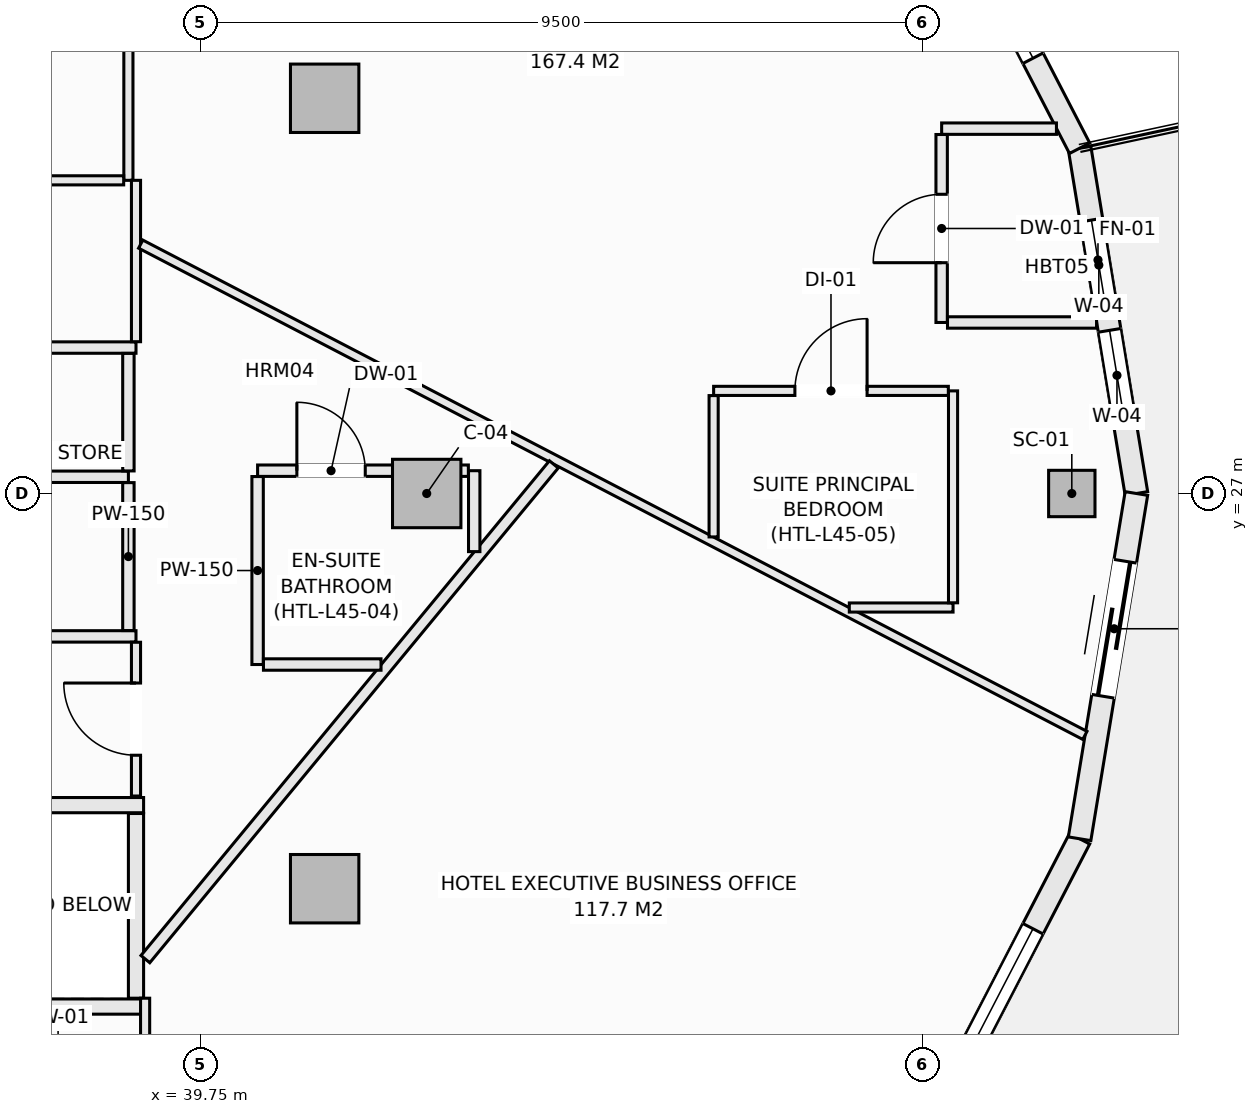
"""IFC4 building model, lengths in metres.
Left out: names, types, materials, properties, quantities, classifications, styles, units other than length and angle.
Written with IfcOpenShell. Run it as: python <this file> out.ifc"""

import sys

from ifc_helpers import new_model, si_unit, direction, frame, frame_2d, origin, origin_2d, place, context, subcontext, project, spatial, rectangle, hollow_rectangle, extrude, element, fill, save


model = new_model("IFC4")
c1 = context("Model", 3, precision=1e-05, world=origin(), true_north=direction((0.0, 1.0)))
c2 = subcontext(c1, "Body", "Model", "MODEL_VIEW")
j1 = project(units=[si_unit("LENGTHUNIT", "METRE"), si_unit("PLANEANGLEUNIT", "RADIAN")], contexts=[c1])
p1 = place(None, origin())
s1 = spatial("IfcSite", under=j1, at=p1, CompositionType="ELEMENT")
p2 = place(p1, origin())
s2 = spatial("IfcBuilding", under=s1, at=p2, CompositionType="ELEMENT")
p3 = place(p2, frame((0.0, 0.0, 173.3)))
s3 = spatial("IfcBuildingStorey", under=s2, at=p3, CompositionType="ELEMENT", Elevation=173.3)
p4 = place(p3, frame((51.212, 27.0, -0.27), z_axis=(0.0, 0.0, 1.0), x_axis=(1.0, 0.0, 0.0)))
e1 = element("IfcColumn", 1, at=p4, inside=s3, PredefinedType="COLUMN", context=c2, shape_type="SweptSolid", body=[
    extrude(hollow_rectangle(XDim=0.61, YDim=0.61, WallThickness=0.025, at=origin_2d()), origin(), (0.0, 0.0, 1.0), 3.4),
])
for number, where, z_axis, x_axis in (
    (2, (42.725, 27.0, -0.27), (0.0, 0.0, 1.0), (1.0, 0.0, 0.0)),
    (3, (41.382, 32.199, -0.27), (0.0, 0.0, 1.0), (1.0, 0.0, 0.0)),
    (4, (41.382, 21.801, -0.27), (0.0, 0.0, 1.0), (1.0, 0.0, 0.0)),
):
    element("IfcColumn", number, at=place(p3, frame(where, z_axis=z_axis, x_axis=x_axis)), inside=s3, PredefinedType="COLUMN", context=c2, shape_type="SweptSolid", body=[
        extrude(rectangle(XDim=0.9, YDim=0.9, at=origin_2d()), origin(), (0.0, 0.0, 1.0), 3.4),
    ])
p5 = place(p3, frame((51.315, 31.542, 0.0), z_axis=(0.0, 0.0, 1.0), x_axis=(0.162394765401, -0.986725868806, 0.0)))
e5 = element("IfcWall", 5, at=p5, inside=s3, PredefinedType="SOLIDWALL", context=c2, shape_type="SweptSolid", body=[
    extrude(rectangle(XDim=4.603, YDim=0.3, at=frame_2d((2.302, 0.0))), origin(), (0.0, 0.0, 1.0), 2.653),
])
p6 = place(p5, frame((0.958, 0.0, 0.74)))
e6 = element("IfcOpeningElement", 6, at=p6, cuts=e5, PredefinedType="OPENING", context=c2, shape_type="SweptSolid", body=[
    extrude(rectangle(XDim=1.2, YDim=1.7, at=frame_2d((0.6, 0.85))), frame((0.0, 0.16, 0.0), z_axis=(0.0, -1.0, 0.0), x_axis=(1.0, 0.0, 0.0)), (0.0, 0.0, 1.0), 0.32),
])
p7 = place(p5, frame((2.428, 0.0, 0.74)))
e7 = element("IfcOpeningElement", 7, at=p7, cuts=e5, PredefinedType="OPENING", context=c2, shape_type="SweptSolid", body=[
    extrude(rectangle(XDim=1.2, YDim=1.7, at=frame_2d((0.6, 0.85))), frame((0.0, 0.16, 0.0), z_axis=(0.0, -1.0, 0.0), x_axis=(1.0, 0.0, 0.0)), (0.0, 0.0, 1.0), 0.32),
])
p8 = place(p3, frame((49.123, 35.775, 0.0), z_axis=(0.0, 0.0, 1.0), x_axis=(0.459810251451, -0.888017191647, 0.0)))
e8 = element("IfcWall", 8, at=p8, inside=s3, PredefinedType="SOLIDWALL", context=c2, shape_type="SweptSolid", body=[
    extrude(rectangle(XDim=4.766, YDim=0.3, at=frame_2d((2.383, 0.0))), origin(), (0.0, 0.0, 1.0), 2.653),
])
p9 = place(p8, frame((1.333, 0.0, 0.74)))
e9 = element("IfcOpeningElement", 9, at=p9, cuts=e8, PredefinedType="OPENING", context=c2, shape_type="SweptSolid", body=[
    extrude(rectangle(XDim=2.1, YDim=1.7, at=frame_2d((1.05, 0.85))), frame((0.0, 0.16, 0.0), z_axis=(0.0, -1.0, 0.0), x_axis=(1.0, 0.0, 0.0)), (0.0, 0.0, 1.0), 0.32),
])
p10 = place(p3, frame((49.123, 18.225, 0.0), z_axis=(0.0, 0.0, 1.0), x_axis=(0.459810251451, 0.888017191647, 0.0)))
e10 = element("IfcWall", 10, at=p10, inside=s3, PredefinedType="SOLIDWALL", context=c2, shape_type="SweptSolid", body=[
    extrude(rectangle(XDim=4.766, YDim=0.3, at=frame_2d((2.383, 0.0))), origin(), (0.0, 0.0, 1.0), 2.653),
])
p11 = place(p10, frame((1.333, 0.0, 0.74)))
e11 = element("IfcOpeningElement", 11, at=p11, cuts=e10, PredefinedType="OPENING", context=c2, shape_type="SweptSolid", body=[
    extrude(rectangle(XDim=2.1, YDim=1.7, at=frame_2d((1.05, 0.85))), frame((0.0, 0.16, 0.0), z_axis=(0.0, -1.0, 0.0), x_axis=(1.0, 0.0, 0.0)), (0.0, 0.0, 1.0), 0.32),
])
p12 = place(p3, frame((51.315, 22.458, 0.0), z_axis=(0.0, 0.0, 1.0), x_axis=(0.162394765401, 0.986725868806, 0.0)))
e12 = element("IfcWall", 12, at=p12, inside=s3, PredefinedType="SOLIDWALL", context=c2, shape_type="SweptSolid", body=[
    extrude(rectangle(XDim=4.603, YDim=0.3, at=frame_2d((2.302, 0.0))), origin(), (0.0, 0.0, 1.0), 2.653),
])
p13 = place(p12, frame((1.9, 0.0, 0.0)))
e13 = element("IfcOpeningElement", 13, at=p13, cuts=e12, PredefinedType="OPENING", context=c2, shape_type="SweptSolid", body=[
    extrude(rectangle(XDim=1.8, YDim=2.25, at=frame_2d((0.9, 1.125))), frame((0.0, 0.16, 0.0), z_axis=(0.0, -1.0, 0.0), x_axis=(1.0, 0.0, 0.0)), (0.0, 0.0, 1.0), 0.32),
])
p14 = place(p3, frame((52.18, 16.779, 0.0), z_axis=(0.0, 0.0, 1.0), x_axis=(0.439637174641, 0.898175458735, 0.0)))
e14 = element("IfcWall", 14, at=p14, inside=s3, PredefinedType="PARAPET", context=c2, shape_type="SweptSolid", body=[
    extrude(rectangle(XDim=5.567, YDim=0.22, at=frame_2d((2.784, 0.0))), origin(), (0.0, 0.0, 1.0), 0.52),
])
for number, where, z_axis, x_axis in (
    (15, (36.75, 22.9, 0.0), (0.0, 0.0, 1.0), (1.0, 0.0, 0.0)),
    (16, (36.75, 20.25, 0.0), (0.0, 0.0, 1.0), (1.0, 0.0, 0.0)),
):
    element("IfcWall", number, at=place(p3, frame(where, z_axis=z_axis, x_axis=x_axis)), inside=s3, PredefinedType="SOLIDWALL", context=c2, shape_type="SweptSolid", body=[
        extrude(rectangle(XDim=2.25, YDim=0.2, at=frame_2d((1.125, 0.0))), origin(), (0.0, 0.0, 1.0), 3.13),
    ])
p15 = place(p3, frame((38.9, 20.36, 0.0), z_axis=(0.0, 0.0, 1.0), x_axis=(0.0, 1.0, 0.0)))
e17 = element("IfcWall", 17, at=p15, inside=s3, PredefinedType="SOLIDWALL", context=c2, shape_type="SweptSolid", body=[
    extrude(rectangle(XDim=2.43, YDim=0.2, at=frame_2d((1.215, 0.0))), origin(), (0.0, 0.0, 1.0), 3.13),
])
p16 = place(p3, frame((30.077, 28.92, 0.0), z_axis=(0.0, 0.0, 1.0), x_axis=(1.0, 0.0, 0.0)))
e18 = element("IfcWall", 18, at=p16, inside=s3, PredefinedType="PARTITIONING", context=c2, shape_type="SweptSolid", body=[
    extrude(rectangle(XDim=8.823, YDim=0.15, at=frame_2d((4.412, 0.0))), origin(), (0.0, 0.0, 1.0), 3.13),
])
p17 = place(p16, frame((1.342, 0.0, 0.0)))
e19 = element("IfcOpeningElement", 19, at=p17, cuts=e18, PredefinedType="OPENING", context=c2, shape_type="SweptSolid", body=[
    extrude(rectangle(XDim=0.95, YDim=2.1, at=frame_2d((0.475, 1.05))), frame((0.0, 0.085, 0.0), z_axis=(0.0, -1.0, 0.0), x_axis=(1.0, 0.0, 0.0)), (0.0, 0.0, 1.0), 0.17),
])
p18 = place(p16, frame((5.343, 0.0, 0.0)))
e20 = element("IfcOpeningElement", 20, at=p18, cuts=e18, PredefinedType="OPENING", context=c2, shape_type="SweptSolid", body=[
    extrude(rectangle(XDim=0.95, YDim=2.1, at=frame_2d((0.475, 1.05))), frame((0.0, 0.085, 0.0), z_axis=(0.0, -1.0, 0.0), x_axis=(1.0, 0.0, 0.0)), (0.0, 0.0, 1.0), 0.17),
])
p19 = place(p3, frame((33.377, 25.12, 0.0), z_axis=(0.0, 0.0, 1.0), x_axis=(1.0, 0.0, 0.0)))
e21 = element("IfcWall", 21, at=p19, inside=s3, PredefinedType="PARTITIONING", context=c2, shape_type="SweptSolid", body=[
    extrude(rectangle(XDim=5.523, YDim=0.15, at=frame_2d((2.761, 0.0))), origin(), (0.0, 0.0, 1.0), 3.13),
])
p20 = place(p19, frame((2.287, 0.0, 0.0)))
e22 = element("IfcOpeningElement", 22, at=p20, cuts=e21, PredefinedType="OPENING", context=c2, shape_type="SweptSolid", body=[
    extrude(rectangle(XDim=0.95, YDim=2.1, at=frame_2d((0.475, 1.05))), frame((0.0, 0.085, 0.0), z_axis=(0.0, -1.0, 0.0), x_axis=(1.0, 0.0, 0.0)), (0.0, 0.0, 1.0), 0.17),
])
p21 = place(p3, frame((33.377, 27.22, 0.0), z_axis=(0.0, 0.0, 1.0), x_axis=(1.0, 0.0, 0.0)))
e23 = element("IfcWall", 23, at=p21, inside=s3, PredefinedType="PARTITIONING", context=c2, shape_type="SweptSolid", body=[
    extrude(rectangle(XDim=5.423, YDim=0.15, at=frame_2d((2.711, 0.0))), origin(), (0.0, 0.0, 1.0), 3.13),
])
p22 = place(p3, frame((38.8, 25.197, 0.0), z_axis=(0.0, 0.0, 1.0), x_axis=(0.0, 1.0, 0.0)))
e24 = element("IfcWall", 24, at=p22, inside=s3, PredefinedType="PARTITIONING", context=c2, shape_type="SweptSolid", body=[
    extrude(rectangle(XDim=1.946, YDim=0.15, at=frame_2d((0.973, 0.0))), origin(), (0.0, 0.0, 1.0), 3.13),
])
p23 = place(p3, frame((38.8, 27.297, 0.0), z_axis=(0.0, 0.0, 1.0), x_axis=(0.0, 1.0, 0.0)))
e25 = element("IfcWall", 25, at=p23, inside=s3, PredefinedType="PARTITIONING", context=c2, shape_type="SweptSolid", body=[
    extrude(rectangle(XDim=1.546, YDim=0.15, at=frame_2d((0.773, 0.0))), origin(), (0.0, 0.0, 1.0), 3.13),
])
p24 = place(p3, frame((38.8, 31.12, 0.0), z_axis=(0.0, 0.0, 1.0), x_axis=(0.0, 1.0, 0.0)))
e26 = element("IfcWall", 26, at=p24, inside=s3, PredefinedType="PARTITIONING", context=c2, shape_type="SweptSolid", body=[
    extrude(rectangle(XDim=2.63, YDim=0.12, at=frame_2d((1.315, 0.0))), origin(), (0.0, 0.0, 1.0), 3.13),
])
p25 = place(p3, frame((30.062, 31.12, 0.0), z_axis=(0.0, 0.0, 1.0), x_axis=(1.0, 0.0, 0.0)))
e27 = element("IfcWall", 27, at=p25, inside=s3, PredefinedType="PARTITIONING", context=c2, shape_type="SweptSolid", body=[
    extrude(rectangle(XDim=8.676, YDim=0.12, at=frame_2d((4.338, 0.0))), origin(), (0.0, 0.0, 1.0), 3.13),
])
p26 = place(p25, frame((3.863, 0.0, 0.0)))
e28 = element("IfcOpeningElement", 28, at=p26, cuts=e27, PredefinedType="OPENING", context=c2, shape_type="SweptSolid", body=[
    extrude(rectangle(XDim=0.95, YDim=2.1, at=frame_2d((0.475, 1.05))), frame((0.0, 0.07, 0.0), z_axis=(0.0, -1.0, 0.0), x_axis=(1.0, 0.0, 0.0)), (0.0, 0.0, 1.0), 0.14),
])
p27 = place(p3, frame((39.02, 19.44, 0.0), z_axis=(0.0, 0.0, 1.0), x_axis=(0.0, 1.0, 0.0)))
e29 = element("IfcWall", 29, at=p27, inside=s3, PredefinedType="PARTITIONING", context=c2, shape_type="SweptSolid", body=[
    extrude(rectangle(XDim=0.92, YDim=0.12, at=frame_2d((0.46, 0.0))), origin(), (0.0, 0.0, 1.0), 3.13),
])
p28 = place(p3, frame((38.9, 23.02, 0.0), z_axis=(0.0, 0.0, 1.0), x_axis=(0.0, 1.0, 0.0)))
e30 = element("IfcWall", 30, at=p28, inside=s3, PredefinedType="PARTITIONING", context=c2, shape_type="SweptSolid", body=[
    extrude(rectangle(XDim=2.023, YDim=0.12, at=frame_2d((1.011, 0.0))), origin(), (0.0, 0.0, 1.0), 3.13),
])
p29 = place(p28, frame((0.537, 0.0, 0.0)))
e31 = element("IfcOpeningElement", 31, at=p29, cuts=e30, PredefinedType="OPENING", context=c2, shape_type="SweptSolid", body=[
    extrude(rectangle(XDim=0.95, YDim=2.1, at=frame_2d((0.475, 1.05))), frame((0.0, 0.07, 0.0), z_axis=(0.0, -1.0, 0.0), x_axis=(1.0, 0.0, 0.0)), (0.0, 0.0, 1.0), 0.14),
])
p30 = place(p3, frame((38.9, 28.997, 0.0), z_axis=(0.0, 0.0, 1.0), x_axis=(0.0, 1.0, 0.0)))
e32 = element("IfcWall", 32, at=p30, inside=s3, PredefinedType="PARTITIONING", context=c2, shape_type="SweptSolid", body=[
    extrude(rectangle(XDim=2.123, YDim=0.12, at=frame_2d((1.062, 0.0))), origin(), (0.0, 0.0, 1.0), 3.13),
])
p31 = place(p3, frame((38.962, 30.281, 0.0), z_axis=(0.0, 0.0, 1.0), x_axis=(0.887114590422, -0.461549242725, 0.0)))
e33 = element("IfcWall", 33, at=p31, inside=s3, PredefinedType="PARTITIONING", context=c2, shape_type="SweptSolid", body=[
    extrude(rectangle(XDim=14.004, YDim=0.12, at=frame_2d((7.002, 0.0))), origin(), (0.0, 0.0, 1.0), 2.505),
])
p32 = place(p3, frame((39.023, 20.874, 0.0), z_axis=(0.0, 0.0, 1.0), x_axis=(0.636698291185, 0.771113017658, 0.0)))
e34 = element("IfcWall", 34, at=p32, inside=s3, PredefinedType="PARTITIONING", context=c2, shape_type="SweptSolid", body=[
    extrude(rectangle(XDim=8.44, YDim=0.15, at=frame_2d((4.22, 0.0))), origin(), (0.0, 0.0, 1.0), 2.505),
])
p33 = place(p3, frame((43.35, 26.235, 0.0), z_axis=(0.0, 0.0, 1.0), x_axis=(0.0, 1.0, 0.0)))
e35 = element("IfcWall", 35, at=p33, inside=s3, PredefinedType="PARTITIONING", context=c2, shape_type="SweptSolid", body=[
    extrude(rectangle(XDim=1.065, YDim=0.15, at=frame_2d((0.532, 0.0))), origin(), (0.0, 0.0, 1.0), 3.13),
])
p34 = place(p3, frame((40.5, 27.3, 0.0), z_axis=(0.0, 0.0, 1.0), x_axis=(1.0, 0.0, 0.0)))
e36 = element("IfcWall", 36, at=p34, inside=s3, PredefinedType="PARTITIONING", context=c2, shape_type="SweptSolid", body=[
    extrude(rectangle(XDim=2.773, YDim=0.15, at=frame_2d((1.386, 0.0))), origin(), (0.0, 0.0, 1.0), 3.13),
])
p35 = place(p34, frame((0.517, 0.0, 0.0)))
e37 = element("IfcOpeningElement", 37, at=p35, cuts=e36, PredefinedType="OPENING", context=c2, shape_type="SweptSolid", body=[
    extrude(rectangle(XDim=0.9, YDim=2.1, at=frame_2d((0.45, 1.05))), frame((0.0, 0.085, 0.0), z_axis=(0.0, -1.0, 0.0), x_axis=(1.0, 0.0, 0.0)), (0.0, 0.0, 1.0), 0.17),
])
p36 = place(p3, frame((40.5, 24.75, 0.0), z_axis=(0.0, 0.0, 1.0), x_axis=(0.0, 1.0, 0.0)))
e38 = element("IfcWall", 38, at=p36, inside=s3, PredefinedType="PARTITIONING", context=c2, shape_type="SweptSolid", body=[
    extrude(rectangle(XDim=2.473, YDim=0.15, at=frame_2d((1.236, 0.0))), origin(), (0.0, 0.0, 1.0), 3.13),
])
p37 = place(p3, frame((40.577, 24.75, 0.0), z_axis=(0.0, 0.0, 1.0), x_axis=(1.0, 0.0, 0.0)))
e39 = element("IfcWall", 39, at=p37, inside=s3, PredefinedType="PARTITIONING", context=c2, shape_type="SweptSolid", body=[
    extrude(rectangle(XDim=1.547, YDim=0.15, at=frame_2d((0.773, 0.0))), origin(), (0.0, 0.0, 1.0), 3.13),
])
p38 = place(p3, frame((49.5, 31.8, 0.0), z_axis=(0.0, 0.0, 1.0), x_axis=(1.0, 0.0, 0.0)))
e40 = element("IfcWall", 40, at=p38, inside=s3, PredefinedType="PARTITIONING", context=c2, shape_type="SweptSolid", body=[
    extrude(rectangle(XDim=1.51, YDim=0.15, at=frame_2d((0.755, 0.0))), origin(), (0.0, 0.0, 1.0), 3.13),
])
p39 = place(p3, frame((49.5, 29.25, 0.0), z_axis=(0.0, 0.0, 1.0), x_axis=(0.0, 1.0, 0.0)))
e41 = element("IfcWall", 41, at=p39, inside=s3, PredefinedType="PARTITIONING", context=c2, shape_type="SweptSolid", body=[
    extrude(rectangle(XDim=2.473, YDim=0.15, at=frame_2d((1.236, 0.0))), origin(), (0.0, 0.0, 1.0), 2.653),
])
p40 = place(p39, frame((0.787, 0.0, 0.0)))
e42 = element("IfcOpeningElement", 42, at=p40, cuts=e41, PredefinedType="OPENING", context=c2, shape_type="SweptSolid", body=[
    extrude(rectangle(XDim=0.9, YDim=2.1, at=frame_2d((0.45, 1.05))), frame((0.0, 0.085, 0.0), z_axis=(0.0, -1.0, 0.0), x_axis=(1.0, 0.0, 0.0)), (0.0, 0.0, 1.0), 0.17),
])
p41 = place(p3, frame((49.577, 29.25, 0.0), z_axis=(0.0, 0.0, 1.0), x_axis=(1.0, 0.0, 0.0)))
e43 = element("IfcWall", 43, at=p41, inside=s3, PredefinedType="PARTITIONING", context=c2, shape_type="SweptSolid", body=[
    extrude(rectangle(XDim=1.961, YDim=0.15, at=frame_2d((0.98, 0.0))), origin(), (0.0, 0.0, 1.0), 3.13),
])
p42 = place(p3, frame((48.285, 25.5, 0.0), z_axis=(0.0, 0.0, 1.0), x_axis=(1.0, 0.0, 0.0)))
e44 = element("IfcWall", 44, at=p42, inside=s3, PredefinedType="PARTITIONING", context=c2, shape_type="SweptSolid", body=[
    extrude(rectangle(XDim=1.365, YDim=0.12, at=frame_2d((0.682, 0.0))), origin(), (0.0, 0.0, 1.0), 3.13),
])
p43 = place(p3, frame((49.65, 25.562, 0.0), z_axis=(0.0, 0.0, 1.0), x_axis=(0.0, 1.0, 0.0)))
e45 = element("IfcWall", 45, at=p43, inside=s3, PredefinedType="PARTITIONING", context=c2, shape_type="SweptSolid", body=[
    extrude(rectangle(XDim=2.788, YDim=0.12, at=frame_2d((1.394, 0.0))), origin(), (0.0, 0.0, 1.0), 3.13),
])
p44 = place(p3, frame((46.5, 28.35, 0.0), z_axis=(0.0, 0.0, 1.0), x_axis=(1.0, 0.0, 0.0)))
e46 = element("IfcWall", 46, at=p44, inside=s3, PredefinedType="PARTITIONING", context=c2, shape_type="SweptSolid", body=[
    extrude(rectangle(XDim=3.088, YDim=0.12, at=frame_2d((1.544, 0.0))), origin(), (0.0, 0.0, 1.0), 3.13),
])
p45 = place(p44, frame((1.069, 0.0, 0.0)))
e47 = element("IfcOpeningElement", 47, at=p45, cuts=e46, PredefinedType="OPENING", context=c2, shape_type="SweptSolid", body=[
    extrude(rectangle(XDim=0.95, YDim=2.1, at=frame_2d((0.475, 1.05))), frame((0.0, 0.07, 0.0), z_axis=(0.0, -1.0, 0.0), x_axis=(1.0, 0.0, 0.0)), (0.0, 0.0, 1.0), 0.14),
])
p46 = place(p3, frame((46.5, 26.429, 0.0), z_axis=(0.0, 0.0, 1.0), x_axis=(0.0, 1.0, 0.0)))
e48 = element("IfcWall", 48, at=p46, inside=s3, PredefinedType="PARTITIONING", context=c2, shape_type="SweptSolid", body=[
    extrude(rectangle(XDim=1.859, YDim=0.12, at=frame_2d((0.93, 0.0))), origin(), (0.0, 0.0, 1.0), 3.13),
])
p47 = place(p6, origin())
e49 = element("IfcWindow", 49, at=p47, inside=s3, PartitioningType="SINGLE_PANEL", PredefinedType="WINDOW", context=c2, shape_type="SweptSolid", body=[
    extrude(rectangle(XDim=1.2, YDim=1.7, at=frame_2d((0.6, 0.85))), frame((0.0, 0.03, 0.0), z_axis=(0.0, -1.0, 0.0), x_axis=(1.0, 0.0, 0.0)), (0.0, 0.0, 1.0), 0.06),
])
fill(e6, e49)
p48 = place(p9, origin())
e50 = element("IfcWindow", 50, at=p48, inside=s3, PartitioningType="SINGLE_PANEL", PredefinedType="WINDOW", context=c2, shape_type="SweptSolid", body=[
    extrude(rectangle(XDim=2.1, YDim=1.7, at=frame_2d((1.05, 0.85))), frame((0.0, 0.03, 0.0), z_axis=(0.0, -1.0, 0.0), x_axis=(1.0, 0.0, 0.0)), (0.0, 0.0, 1.0), 0.06),
])
fill(e9, e50)
p49 = place(p11, origin())
e51 = element("IfcWindow", 51, at=p49, inside=s3, PartitioningType="SINGLE_PANEL", PredefinedType="WINDOW", context=c2, shape_type="SweptSolid", body=[
    extrude(rectangle(XDim=2.1, YDim=1.7, at=frame_2d((1.05, 0.85))), frame((0.0, 0.03, 0.0), z_axis=(0.0, -1.0, 0.0), x_axis=(1.0, 0.0, 0.0)), (0.0, 0.0, 1.0), 0.06),
])
fill(e11, e51)
p50 = place(p13, frame((1.8, 0.0, 0.0), z_axis=(0.0, 0.0, 1.0), x_axis=(-1.0, 0.0, 0.0)))
e52 = element("IfcDoor", 52, at=p50, inside=s3, OperationType="SLIDING_TO_LEFT", PredefinedType="DOOR", context=c2, shape_type="SweptSolid", body=[
    extrude(rectangle(XDim=1.8, YDim=2.25, at=frame_2d((0.9, 1.125))), frame((0.0, 0.025, 0.0), z_axis=(0.0, -1.0, 0.0), x_axis=(1.0, 0.0, 0.0)), (0.0, 0.0, 1.0), 0.05),
])
fill(e13, e52)
p51 = place(p29, origin())
e53 = element("IfcDoor", 53, at=p51, inside=s3, OperationType="SINGLE_SWING_RIGHT", PredefinedType="DOOR", context=c2, shape_type="SweptSolid", body=[
    extrude(rectangle(XDim=0.95, YDim=2.1, at=frame_2d((0.475, 1.05))), frame((0.0, 0.025, 0.0), z_axis=(0.0, -1.0, 0.0), x_axis=(1.0, 0.0, 0.0)), (0.0, 0.0, 1.0), 0.05),
])
fill(e31, e53)
p52 = place(p35, origin())
e54 = element("IfcDoor", 54, at=p52, inside=s3, OperationType="SINGLE_SWING_LEFT", PredefinedType="DOOR", context=c2, shape_type="SweptSolid", body=[
    extrude(rectangle(XDim=0.9, YDim=2.1, at=frame_2d((0.45, 1.05))), frame((0.0, 0.025, 0.0), z_axis=(0.0, -1.0, 0.0), x_axis=(1.0, 0.0, 0.0)), (0.0, 0.0, 1.0), 0.05),
])
fill(e37, e54)
p53 = place(p45, origin())
e55 = element("IfcDoor", 55, at=p53, inside=s3, OperationType="SINGLE_SWING_RIGHT", PredefinedType="DOOR", context=c2, shape_type="SweptSolid", body=[
    extrude(rectangle(XDim=0.95, YDim=2.1, at=frame_2d((0.475, 1.05))), frame((0.0, 0.025, 0.0), z_axis=(0.0, -1.0, 0.0), x_axis=(1.0, 0.0, 0.0)), (0.0, 0.0, 1.0), 0.05),
])
fill(e47, e55)
p54 = place(p40, origin())
e56 = element("IfcDoor", 56, at=p54, inside=s3, OperationType="SINGLE_SWING_LEFT", PredefinedType="DOOR", context=c2, shape_type="SweptSolid", body=[
    extrude(rectangle(XDim=0.9, YDim=2.1, at=frame_2d((0.45, 1.05))), frame((0.0, 0.025, 0.0), z_axis=(0.0, -1.0, 0.0), x_axis=(1.0, 0.0, 0.0)), (0.0, 0.0, 1.0), 0.05),
])
fill(e42, e56)
p55 = place(p7, origin())
e57 = element("IfcWindow", 57, at=p55, inside=s3, PartitioningType="SINGLE_PANEL", PredefinedType="WINDOW", context=c2, shape_type="SweptSolid", body=[
    extrude(rectangle(XDim=1.2, YDim=1.7, at=frame_2d((0.6, 0.85))), frame((0.0, 0.03, 0.0), z_axis=(0.0, -1.0, 0.0), x_axis=(1.0, 0.0, 0.0)), (0.0, 0.0, 1.0), 0.06),
])
fill(e7, e57)
save(model, sys.argv[1])
